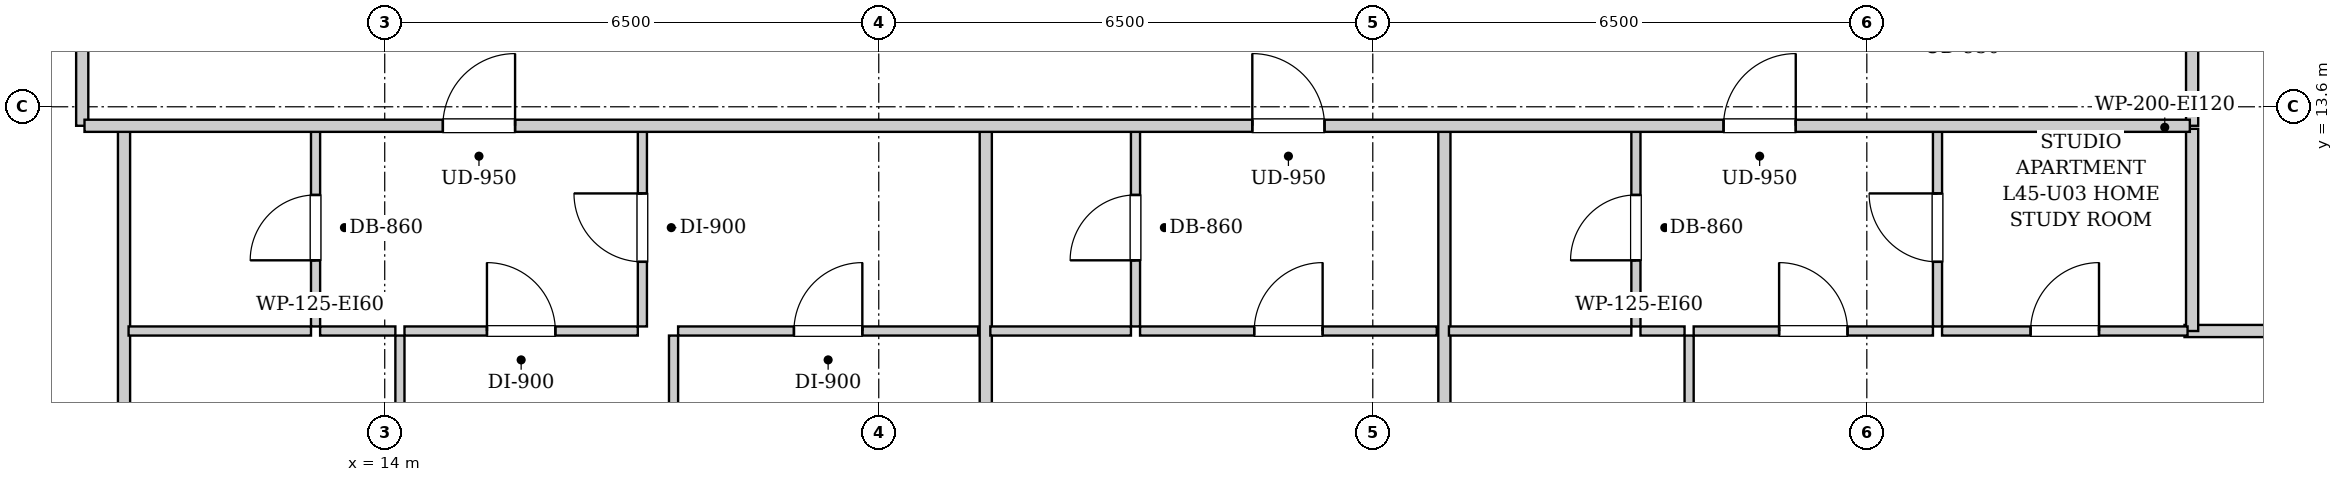
"""IFC4 building model, lengths in metres.
Left out: names, types, materials, properties, quantities, classifications, styles, units other than length and angle.
Written with IfcOpenShell. Run it as: python <this file> out.ifc"""

import sys

from ifc_helpers import new_model, si_unit, direction, frame, frame_2d, origin, place, context, subcontext, project, spatial, rectangle, extrude, element, fill, save


model = new_model("IFC4")
c1 = context("Model", 3, precision=1e-05, world=origin(), true_north=direction((0.0, 1.0)))
c2 = subcontext(c1, "Body", "Model", "MODEL_VIEW")
j1 = project(units=[si_unit("LENGTHUNIT", "METRE"), si_unit("PLANEANGLEUNIT", "RADIAN")], contexts=[c1])
p1 = place(None, origin())
s1 = spatial("IfcSite", under=j1, at=p1, CompositionType="ELEMENT")
p2 = place(p1, origin())
s2 = spatial("IfcBuilding", under=s1, at=p2, CompositionType="ELEMENT")
p3 = place(p2, frame((0.0, 0.0, 156.9)))
s3 = spatial("IfcBuildingStorey", under=s2, at=p3, CompositionType="ELEMENT", Elevation=156.9)
for number, where, z_axis, x_axis in (
    (1, (10.02, 13.35, 0.0), (0.0, 0.0, 1.0), (0.0, 1.0, 0.0)),
    (2, (37.78, 13.35, 0.0), (0.0, 0.0, 1.0), (0.0, 1.0, 0.0)),
):
    element("IfcWall", number, at=place(p3, frame(where, z_axis=z_axis, x_axis=x_axis)), inside=s3, PredefinedType="PARTITIONING", context=c2, shape_type="SweptSolid", body=[
        extrude(rectangle(XDim=1.74, YDim=0.16, at=frame_2d((0.87, 0.0))), origin(), (0.0, 0.0, 1.0), 2.99),
    ])
p4 = place(p3, frame((10.57, 4.08, 0.0), z_axis=(0.0, 0.0, 1.0), x_axis=(0.0, 1.0, 0.0)))
e3 = element("IfcWall", 3, at=p4, inside=s3, PredefinedType="PARTITIONING", context=c2, shape_type="SweptSolid", body=[
    extrude(rectangle(XDim=9.23, YDim=0.16, at=frame_2d((4.615, 0.0))), origin(), (0.0, 0.0, 1.0), 2.99),
])
p5 = place(p3, frame((13.09, 10.71, 0.0), z_axis=(0.0, 0.0, 1.0), x_axis=(0.0, 1.0, 0.0)))
e4 = element("IfcWall", 4, at=p5, inside=s3, PredefinedType="PARTITIONING", context=c2, shape_type="SweptSolid", body=[
    extrude(rectangle(XDim=2.6, YDim=0.12, at=frame_2d((1.3, 0.0))), origin(), (0.0, 0.0, 1.0), 2.99),
])
p6 = place(p5, frame((0.87, 0.0, 0.0)))
e5 = element("IfcOpeningElement", 5, at=p6, cuts=e4, PredefinedType="OPENING", context=c2, shape_type="SweptSolid", body=[
    extrude(rectangle(XDim=0.86, YDim=2.05, at=frame_2d((0.43, 1.025))), frame((0.0, 0.07, 0.0), z_axis=(0.0, -1.0, 0.0), x_axis=(1.0, 0.0, 0.0)), (0.0, 0.0, 1.0), 0.14),
])
p7 = place(p3, frame((10.63, 10.65, 0.0), z_axis=(0.0, 0.0, 1.0), x_axis=(1.0, 0.0, 0.0)))
e6 = element("IfcWall", 6, at=p7, inside=s3, PredefinedType="PARTITIONING", context=c2, shape_type="SweptSolid", body=[
    extrude(rectangle(XDim=2.4, YDim=0.12, at=frame_2d((1.2, 0.0))), origin(), (0.0, 0.0, 1.0), 2.99),
])
p8 = place(p3, frame((17.39, 10.71, 0.0), z_axis=(0.0, 0.0, 1.0), x_axis=(0.0, 1.0, 0.0)))
e7 = element("IfcWall", 7, at=p8, inside=s3, PredefinedType="PARTITIONING", context=c2, shape_type="SweptSolid", body=[
    extrude(rectangle(XDim=2.6, YDim=0.12, at=frame_2d((1.3, 0.0))), origin(), (0.0, 0.0, 1.0), 2.99),
])
p9 = place(p8, frame((0.85, 0.0, 0.0)))
e8 = element("IfcOpeningElement", 8, at=p9, cuts=e7, PredefinedType="OPENING", context=c2, shape_type="SweptSolid", body=[
    extrude(rectangle(XDim=0.9, YDim=2.05, at=frame_2d((0.45, 1.025))), frame((0.0, 0.07, 0.0), z_axis=(0.0, -1.0, 0.0), x_axis=(1.0, 0.0, 0.0)), (0.0, 0.0, 1.0), 0.14),
])
p10 = place(p3, frame((13.15, 10.65, 0.0), z_axis=(0.0, 0.0, 1.0), x_axis=(1.0, 0.0, 0.0)))
e9 = element("IfcWall", 9, at=p10, inside=s3, PredefinedType="PARTITIONING", context=c2, shape_type="SweptSolid", body=[
    extrude(rectangle(XDim=0.99, YDim=0.12, at=frame_2d((0.495, 0.0))), origin(), (0.0, 0.0, 1.0), 2.99),
])
p11 = place(p3, frame((14.26, 10.65, 0.0), z_axis=(0.0, 0.0, 1.0), x_axis=(1.0, 0.0, 0.0)))
e10 = element("IfcWall", 10, at=p11, inside=s3, PredefinedType="PARTITIONING", context=c2, shape_type="SweptSolid", body=[
    extrude(rectangle(XDim=3.07, YDim=0.12, at=frame_2d((1.535, 0.0))), origin(), (0.0, 0.0, 1.0), 2.99),
])
p12 = place(p11, frame((1.085, 0.0, 0.0)))
e11 = element("IfcOpeningElement", 11, at=p12, cuts=e10, PredefinedType="OPENING", context=c2, shape_type="SweptSolid", body=[
    extrude(rectangle(XDim=0.9, YDim=2.05, at=frame_2d((0.45, 1.025))), frame((0.0, 0.07, 0.0), z_axis=(0.0, -1.0, 0.0), x_axis=(1.0, 0.0, 0.0)), (0.0, 0.0, 1.0), 0.14),
])
p13 = place(p3, frame((17.86, 10.65, 0.0), z_axis=(0.0, 0.0, 1.0), x_axis=(1.0, 0.0, 0.0)))
e12 = element("IfcWall", 12, at=p13, inside=s3, PredefinedType="PARTITIONING", context=c2, shape_type="SweptSolid", body=[
    extrude(rectangle(XDim=3.948, YDim=0.12, at=frame_2d((1.974, 0.0))), origin(), (0.0, 0.0, 1.0), 2.99),
])
p14 = place(p13, frame((1.524, 0.0, 0.0)))
e13 = element("IfcOpeningElement", 13, at=p14, cuts=e12, PredefinedType="OPENING", context=c2, shape_type="SweptSolid", body=[
    extrude(rectangle(XDim=0.9, YDim=2.05, at=frame_2d((0.45, 1.025))), frame((0.0, 0.07, 0.0), z_axis=(0.0, -1.0, 0.0), x_axis=(1.0, 0.0, 0.0)), (0.0, 0.0, 1.0), 0.14),
])
p15 = place(p3, frame((14.2, 6.23, 0.0), z_axis=(0.0, 0.0, 1.0), x_axis=(0.0, 1.0, 0.0)))
e14 = element("IfcWall", 14, at=p15, inside=s3, PredefinedType="PARTITIONING", context=c2, shape_type="SweptSolid", body=[
    extrude(rectangle(XDim=4.36, YDim=0.12, at=frame_2d((2.18, 0.0))), origin(), (0.0, 0.0, 1.0), 2.99),
])
p16 = place(p15, frame((1.73, 0.0, 0.0)))
e15 = element("IfcOpeningElement", 15, at=p16, cuts=e14, PredefinedType="OPENING", context=c2, shape_type="SweptSolid", body=[
    extrude(rectangle(XDim=0.9, YDim=2.05, at=frame_2d((0.45, 1.025))), frame((0.0, 0.07, 0.0), z_axis=(0.0, -1.0, 0.0), x_axis=(1.0, 0.0, 0.0)), (0.0, 0.0, 1.0), 0.14),
])
p17 = place(p3, frame((17.8, 4.08, 0.0), z_axis=(0.0, 0.0, 1.0), x_axis=(0.0, 1.0, 0.0)))
e16 = element("IfcWall", 16, at=p17, inside=s3, PredefinedType="PARTITIONING", context=c2, shape_type="SweptSolid", body=[
    extrude(rectangle(XDim=6.51, YDim=0.12, at=frame_2d((3.255, 0.0))), origin(), (0.0, 0.0, 1.0), 2.442),
])
p18 = place(p17, frame((2.79, 0.0, 0.0)))
e17 = element("IfcOpeningElement", 17, at=p18, cuts=e16, PredefinedType="OPENING", context=c2, shape_type="SweptSolid", body=[
    extrude(rectangle(XDim=0.9, YDim=2.05, at=frame_2d((0.45, 1.025))), frame((0.0, 0.07, 0.0), z_axis=(0.0, -1.0, 0.0), x_axis=(1.0, 0.0, 0.0)), (0.0, 0.0, 1.0), 0.14),
])
p19 = place(p3, frame((21.908, 4.08, 0.0), z_axis=(0.0, 0.0, 1.0), x_axis=(0.0, 1.0, 0.0)))
e18 = element("IfcWall", 18, at=p19, inside=s3, PredefinedType="PARTITIONING", context=c2, shape_type="SweptSolid", body=[
    extrude(rectangle(XDim=9.23, YDim=0.16, at=frame_2d((4.615, 0.0))), origin(), (0.0, 0.0, 1.0), 2.99),
])
p20 = place(p3, frame((23.878, 10.71, 0.0), z_axis=(0.0, 0.0, 1.0), x_axis=(0.0, 1.0, 0.0)))
e19 = element("IfcWall", 19, at=p20, inside=s3, PredefinedType="PARTITIONING", context=c2, shape_type="SweptSolid", body=[
    extrude(rectangle(XDim=2.6, YDim=0.12, at=frame_2d((1.3, 0.0))), origin(), (0.0, 0.0, 1.0), 2.99),
])
p21 = place(p20, frame((0.87, 0.0, 0.0)))
e20 = element("IfcOpeningElement", 20, at=p21, cuts=e19, PredefinedType="OPENING", context=c2, shape_type="SweptSolid", body=[
    extrude(rectangle(XDim=0.86, YDim=2.05, at=frame_2d((0.43, 1.025))), frame((0.0, 0.07, 0.0), z_axis=(0.0, -1.0, 0.0), x_axis=(1.0, 0.0, 0.0)), (0.0, 0.0, 1.0), 0.14),
])
p22 = place(p3, frame((21.968, 10.65, 0.0), z_axis=(0.0, 0.0, 1.0), x_axis=(1.0, 0.0, 0.0)))
e21 = element("IfcWall", 21, at=p22, inside=s3, PredefinedType="PARTITIONING", context=c2, shape_type="SweptSolid", body=[
    extrude(rectangle(XDim=1.85, YDim=0.12, at=frame_2d((0.925, 0.0))), origin(), (0.0, 0.0, 1.0), 2.99),
])
p23 = place(p3, frame((23.938, 10.65, 0.0), z_axis=(0.0, 0.0, 1.0), x_axis=(1.0, 0.0, 0.0)))
e22 = element("IfcWall", 22, at=p23, inside=s3, PredefinedType="PARTITIONING", context=c2, shape_type="SweptSolid", body=[
    extrude(rectangle(XDim=3.904, YDim=0.12, at=frame_2d((1.952, 0.0))), origin(), (0.0, 0.0, 1.0), 2.99),
])
p24 = place(p23, frame((1.502, 0.0, 0.0)))
e23 = element("IfcOpeningElement", 23, at=p24, cuts=e22, PredefinedType="OPENING", context=c2, shape_type="SweptSolid", body=[
    extrude(rectangle(XDim=0.9, YDim=2.05, at=frame_2d((0.45, 1.025))), frame((0.0, 0.07, 0.0), z_axis=(0.0, -1.0, 0.0), x_axis=(1.0, 0.0, 0.0)), (0.0, 0.0, 1.0), 0.14),
])
p25 = place(p3, frame((37.68, 10.65, 0.0), z_axis=(0.0, 0.0, 1.0), x_axis=(1.0, 0.0, 0.0)))
e24 = element("IfcWall", 24, at=p25, inside=s3, PredefinedType="PARTITIONING", context=c2, shape_type="SweptSolid", body=[
    extrude(rectangle(XDim=2.34, YDim=0.16, at=frame_2d((1.17, 0.0))), origin(), (0.0, 0.0, 1.0), 2.99),
])
p26 = place(p3, frame((37.78, 10.65, 0.0), z_axis=(0.0, 0.0, 1.0), x_axis=(0.0, 1.0, 0.0)))
e25 = element("IfcWall", 25, at=p26, inside=s3, PredefinedType="PARTITIONING", context=c2, shape_type="SweptSolid", body=[
    extrude(rectangle(XDim=2.66, YDim=0.16, at=frame_2d((1.33, 0.0))), origin(), (0.0, 0.0, 1.0), 2.99),
])
p27 = place(p3, frame((27.942, 4.08, 0.0), z_axis=(0.0, 0.0, 1.0), x_axis=(0.0, 1.0, 0.0)))
e26 = element("IfcWall", 26, at=p27, inside=s3, PredefinedType="PARTITIONING", context=c2, shape_type="SweptSolid", body=[
    extrude(rectangle(XDim=9.23, YDim=0.16, at=frame_2d((4.615, 0.0))), origin(), (0.0, 0.0, 1.0), 2.99),
])
p28 = place(p3, frame((30.462, 10.71, 0.0), z_axis=(0.0, 0.0, 1.0), x_axis=(0.0, 1.0, 0.0)))
e27 = element("IfcWall", 27, at=p28, inside=s3, PredefinedType="PARTITIONING", context=c2, shape_type="SweptSolid", body=[
    extrude(rectangle(XDim=2.6, YDim=0.12, at=frame_2d((1.3, 0.0))), origin(), (0.0, 0.0, 1.0), 2.99),
])
p29 = place(p28, frame((0.87, 0.0, 0.0)))
e28 = element("IfcOpeningElement", 28, at=p29, cuts=e27, PredefinedType="OPENING", context=c2, shape_type="SweptSolid", body=[
    extrude(rectangle(XDim=0.86, YDim=2.05, at=frame_2d((0.43, 1.025))), frame((0.0, 0.07, 0.0), z_axis=(0.0, -1.0, 0.0), x_axis=(1.0, 0.0, 0.0)), (0.0, 0.0, 1.0), 0.14),
])
p30 = place(p3, frame((28.002, 10.65, 0.0), z_axis=(0.0, 0.0, 1.0), x_axis=(1.0, 0.0, 0.0)))
e29 = element("IfcWall", 29, at=p30, inside=s3, PredefinedType="PARTITIONING", context=c2, shape_type="SweptSolid", body=[
    extrude(rectangle(XDim=2.4, YDim=0.12, at=frame_2d((1.2, 0.0))), origin(), (0.0, 0.0, 1.0), 2.99),
])
p31 = place(p3, frame((34.43, 10.71, 0.0), z_axis=(0.0, 0.0, 1.0), x_axis=(0.0, 1.0, 0.0)))
e30 = element("IfcWall", 30, at=p31, inside=s3, PredefinedType="PARTITIONING", context=c2, shape_type="SweptSolid", body=[
    extrude(rectangle(XDim=2.6, YDim=0.12, at=frame_2d((1.3, 0.0))), origin(), (0.0, 0.0, 1.0), 2.99),
])
p32 = place(p31, frame((0.85, 0.0, 0.0)))
e31 = element("IfcOpeningElement", 31, at=p32, cuts=e30, PredefinedType="OPENING", context=c2, shape_type="SweptSolid", body=[
    extrude(rectangle(XDim=0.9, YDim=2.05, at=frame_2d((0.45, 1.025))), frame((0.0, 0.07, 0.0), z_axis=(0.0, -1.0, 0.0), x_axis=(1.0, 0.0, 0.0)), (0.0, 0.0, 1.0), 0.14),
])
p33 = place(p3, frame((30.522, 10.65, 0.0), z_axis=(0.0, 0.0, 1.0), x_axis=(1.0, 0.0, 0.0)))
e32 = element("IfcWall", 32, at=p33, inside=s3, PredefinedType="PARTITIONING", context=c2, shape_type="SweptSolid", body=[
    extrude(rectangle(XDim=0.58, YDim=0.12, at=frame_2d((0.29, 0.0))), origin(), (0.0, 0.0, 1.0), 2.99),
])
p34 = place(p3, frame((31.222, 10.65, 0.0), z_axis=(0.0, 0.0, 1.0), x_axis=(1.0, 0.0, 0.0)))
e33 = element("IfcWall", 33, at=p34, inside=s3, PredefinedType="PARTITIONING", context=c2, shape_type="SweptSolid", body=[
    extrude(rectangle(XDim=3.148, YDim=0.12, at=frame_2d((1.574, 0.0))), origin(), (0.0, 0.0, 1.0), 2.99),
])
p35 = place(p34, frame((1.124, 0.0, 0.0)))
e34 = element("IfcOpeningElement", 34, at=p35, cuts=e33, PredefinedType="OPENING", context=c2, shape_type="SweptSolid", body=[
    extrude(rectangle(XDim=0.9, YDim=2.05, at=frame_2d((0.45, 1.025))), frame((0.0, 0.07, 0.0), z_axis=(0.0, -1.0, 0.0), x_axis=(1.0, 0.0, 0.0)), (0.0, 0.0, 1.0), 0.14),
])
p36 = place(p3, frame((34.49, 10.65, 0.0), z_axis=(0.0, 0.0, 1.0), x_axis=(1.0, 0.0, 0.0)))
e35 = element("IfcWall", 35, at=p36, inside=s3, PredefinedType="PARTITIONING", context=c2, shape_type="SweptSolid", body=[
    extrude(rectangle(XDim=3.23, YDim=0.12, at=frame_2d((1.615, 0.0))), origin(), (0.0, 0.0, 1.0), 2.99),
])
p37 = place(p36, frame((1.165, 0.0, 0.0)))
e36 = element("IfcOpeningElement", 36, at=p37, cuts=e35, PredefinedType="OPENING", context=c2, shape_type="SweptSolid", body=[
    extrude(rectangle(XDim=0.9, YDim=2.05, at=frame_2d((0.45, 1.025))), frame((0.0, 0.07, 0.0), z_axis=(0.0, -1.0, 0.0), x_axis=(1.0, 0.0, 0.0)), (0.0, 0.0, 1.0), 0.14),
])
p38 = place(p3, frame((31.162, 4.08, 0.0), z_axis=(0.0, 0.0, 1.0), x_axis=(0.0, 1.0, 0.0)))
e37 = element("IfcWall", 37, at=p38, inside=s3, PredefinedType="PARTITIONING", context=c2, shape_type="SweptSolid", body=[
    extrude(rectangle(XDim=6.51, YDim=0.12, at=frame_2d((3.255, 0.0))), origin(), (0.0, 0.0, 1.0), 2.99),
])
p39 = place(p38, frame((2.79, 0.0, 0.0)))
e38 = element("IfcOpeningElement", 38, at=p39, cuts=e37, PredefinedType="OPENING", context=c2, shape_type="SweptSolid", body=[
    extrude(rectangle(XDim=0.9, YDim=2.05, at=frame_2d((0.45, 1.025))), frame((0.0, 0.07, 0.0), z_axis=(0.0, -1.0, 0.0), x_axis=(1.0, 0.0, 0.0)), (0.0, 0.0, 1.0), 0.14),
])
p40 = place(p3, frame((10.05, 13.35, 0.0), z_axis=(0.0, 0.0, 1.0), x_axis=(1.0, 0.0, 0.0)))
e39 = element("IfcWall", 39, at=p40, inside=s3, PredefinedType="PARTITIONING", context=c2, shape_type="SweptSolid", body=[
    extrude(rectangle(XDim=27.7, YDim=0.16, at=frame_2d((13.85, 0.0))), origin(), (0.0, 0.0, 1.0), 2.99),
])
p41 = place(p40, frame((4.715, 0.0, 0.0)))
e40 = element("IfcOpeningElement", 40, at=p41, cuts=e39, PredefinedType="OPENING", context=c2, shape_type="SweptSolid", body=[
    extrude(rectangle(XDim=0.95, YDim=2.1, at=frame_2d((0.475, 1.05))), frame((0.0, 0.09, 0.0), z_axis=(0.0, -1.0, 0.0), x_axis=(1.0, 0.0, 0.0)), (0.0, 0.0, 1.0), 0.18),
])
p42 = place(p40, frame((15.365, 0.0, 0.0)))
e41 = element("IfcOpeningElement", 41, at=p42, cuts=e39, PredefinedType="OPENING", context=c2, shape_type="SweptSolid", body=[
    extrude(rectangle(XDim=0.95, YDim=2.1, at=frame_2d((0.475, 1.05))), frame((0.0, 0.09, 0.0), z_axis=(0.0, -1.0, 0.0), x_axis=(1.0, 0.0, 0.0)), (0.0, 0.0, 1.0), 0.18),
])
p43 = place(p40, frame((21.565, 0.0, 0.0)))
e42 = element("IfcOpeningElement", 42, at=p43, cuts=e39, PredefinedType="OPENING", context=c2, shape_type="SweptSolid", body=[
    extrude(rectangle(XDim=0.95, YDim=2.1, at=frame_2d((0.475, 1.05))), frame((0.0, 0.09, 0.0), z_axis=(0.0, -1.0, 0.0), x_axis=(1.0, 0.0, 0.0)), (0.0, 0.0, 1.0), 0.18),
])
p44 = place(p6, origin())
e43 = element("IfcDoor", 43, at=p44, inside=s3, OperationType="SINGLE_SWING_LEFT", PredefinedType="DOOR", context=c2, shape_type="SweptSolid", body=[
    extrude(rectangle(XDim=0.86, YDim=2.05, at=frame_2d((0.43, 1.025))), frame((0.0, 0.025, 0.0), z_axis=(0.0, -1.0, 0.0), x_axis=(1.0, 0.0, 0.0)), (0.0, 0.0, 1.0), 0.05),
])
fill(e5, e43)
p45 = place(p9, origin())
e44 = element("IfcDoor", 44, at=p45, inside=s3, OperationType="SINGLE_SWING_RIGHT", PredefinedType="DOOR", context=c2, shape_type="SweptSolid", body=[
    extrude(rectangle(XDim=0.9, YDim=2.05, at=frame_2d((0.45, 1.025))), frame((0.0, 0.025, 0.0), z_axis=(0.0, -1.0, 0.0), x_axis=(1.0, 0.0, 0.0)), (0.0, 0.0, 1.0), 0.05),
])
fill(e8, e44)
p46 = place(p12, origin())
e45 = element("IfcDoor", 45, at=p46, inside=s3, OperationType="SINGLE_SWING_LEFT", PredefinedType="DOOR", context=c2, shape_type="SweptSolid", body=[
    extrude(rectangle(XDim=0.9, YDim=2.05, at=frame_2d((0.45, 1.025))), frame((0.0, 0.025, 0.0), z_axis=(0.0, -1.0, 0.0), x_axis=(1.0, 0.0, 0.0)), (0.0, 0.0, 1.0), 0.05),
])
fill(e11, e45)
p47 = place(p14, origin())
e46 = element("IfcDoor", 46, at=p47, inside=s3, OperationType="SINGLE_SWING_RIGHT", PredefinedType="DOOR", context=c2, shape_type="SweptSolid", body=[
    extrude(rectangle(XDim=0.9, YDim=2.05, at=frame_2d((0.45, 1.025))), frame((0.0, 0.025, 0.0), z_axis=(0.0, -1.0, 0.0), x_axis=(1.0, 0.0, 0.0)), (0.0, 0.0, 1.0), 0.05),
])
fill(e13, e46)
p48 = place(p21, origin())
e47 = element("IfcDoor", 47, at=p48, inside=s3, OperationType="SINGLE_SWING_LEFT", PredefinedType="DOOR", context=c2, shape_type="SweptSolid", body=[
    extrude(rectangle(XDim=0.86, YDim=2.05, at=frame_2d((0.43, 1.025))), frame((0.0, 0.025, 0.0), z_axis=(0.0, -1.0, 0.0), x_axis=(1.0, 0.0, 0.0)), (0.0, 0.0, 1.0), 0.05),
])
fill(e20, e47)
p49 = place(p24, origin())
e48 = element("IfcDoor", 48, at=p49, inside=s3, OperationType="SINGLE_SWING_RIGHT", PredefinedType="DOOR", context=c2, shape_type="SweptSolid", body=[
    extrude(rectangle(XDim=0.9, YDim=2.05, at=frame_2d((0.45, 1.025))), frame((0.0, 0.025, 0.0), z_axis=(0.0, -1.0, 0.0), x_axis=(1.0, 0.0, 0.0)), (0.0, 0.0, 1.0), 0.05),
])
fill(e23, e48)
p50 = place(p29, origin())
e49 = element("IfcDoor", 49, at=p50, inside=s3, OperationType="SINGLE_SWING_LEFT", PredefinedType="DOOR", context=c2, shape_type="SweptSolid", body=[
    extrude(rectangle(XDim=0.86, YDim=2.05, at=frame_2d((0.43, 1.025))), frame((0.0, 0.025, 0.0), z_axis=(0.0, -1.0, 0.0), x_axis=(1.0, 0.0, 0.0)), (0.0, 0.0, 1.0), 0.05),
])
fill(e28, e49)
p51 = place(p32, origin())
e50 = element("IfcDoor", 50, at=p51, inside=s3, OperationType="SINGLE_SWING_RIGHT", PredefinedType="DOOR", context=c2, shape_type="SweptSolid", body=[
    extrude(rectangle(XDim=0.9, YDim=2.05, at=frame_2d((0.45, 1.025))), frame((0.0, 0.025, 0.0), z_axis=(0.0, -1.0, 0.0), x_axis=(1.0, 0.0, 0.0)), (0.0, 0.0, 1.0), 0.05),
])
fill(e31, e50)
p52 = place(p35, origin())
e51 = element("IfcDoor", 51, at=p52, inside=s3, OperationType="SINGLE_SWING_LEFT", PredefinedType="DOOR", context=c2, shape_type="SweptSolid", body=[
    extrude(rectangle(XDim=0.9, YDim=2.05, at=frame_2d((0.45, 1.025))), frame((0.0, 0.025, 0.0), z_axis=(0.0, -1.0, 0.0), x_axis=(1.0, 0.0, 0.0)), (0.0, 0.0, 1.0), 0.05),
])
fill(e34, e51)
p53 = place(p37, origin())
e52 = element("IfcDoor", 52, at=p53, inside=s3, OperationType="SINGLE_SWING_RIGHT", PredefinedType="DOOR", context=c2, shape_type="SweptSolid", body=[
    extrude(rectangle(XDim=0.9, YDim=2.05, at=frame_2d((0.45, 1.025))), frame((0.0, 0.025, 0.0), z_axis=(0.0, -1.0, 0.0), x_axis=(1.0, 0.0, 0.0)), (0.0, 0.0, 1.0), 0.05),
])
fill(e36, e52)
p54 = place(p41, origin())
e53 = element("IfcDoor", 53, at=p54, inside=s3, OperationType="SINGLE_SWING_RIGHT", PredefinedType="DOOR", context=c2, shape_type="SweptSolid", body=[
    extrude(rectangle(XDim=0.95, YDim=2.1, at=frame_2d((0.475, 1.05))), frame((0.0, 0.025, 0.0), z_axis=(0.0, -1.0, 0.0), x_axis=(1.0, 0.0, 0.0)), (0.0, 0.0, 1.0), 0.05),
])
fill(e40, e53)
p55 = place(p42, origin())
e54 = element("IfcDoor", 54, at=p55, inside=s3, OperationType="SINGLE_SWING_LEFT", PredefinedType="DOOR", context=c2, shape_type="SweptSolid", body=[
    extrude(rectangle(XDim=0.95, YDim=2.1, at=frame_2d((0.475, 1.05))), frame((0.0, 0.025, 0.0), z_axis=(0.0, -1.0, 0.0), x_axis=(1.0, 0.0, 0.0)), (0.0, 0.0, 1.0), 0.05),
])
fill(e41, e54)
p56 = place(p43, origin())
e55 = element("IfcDoor", 55, at=p56, inside=s3, OperationType="SINGLE_SWING_RIGHT", PredefinedType="DOOR", context=c2, shape_type="SweptSolid", body=[
    extrude(rectangle(XDim=0.95, YDim=2.1, at=frame_2d((0.475, 1.05))), frame((0.0, 0.025, 0.0), z_axis=(0.0, -1.0, 0.0), x_axis=(1.0, 0.0, 0.0)), (0.0, 0.0, 1.0), 0.05),
])
fill(e42, e55)
save(model, sys.argv[1])
